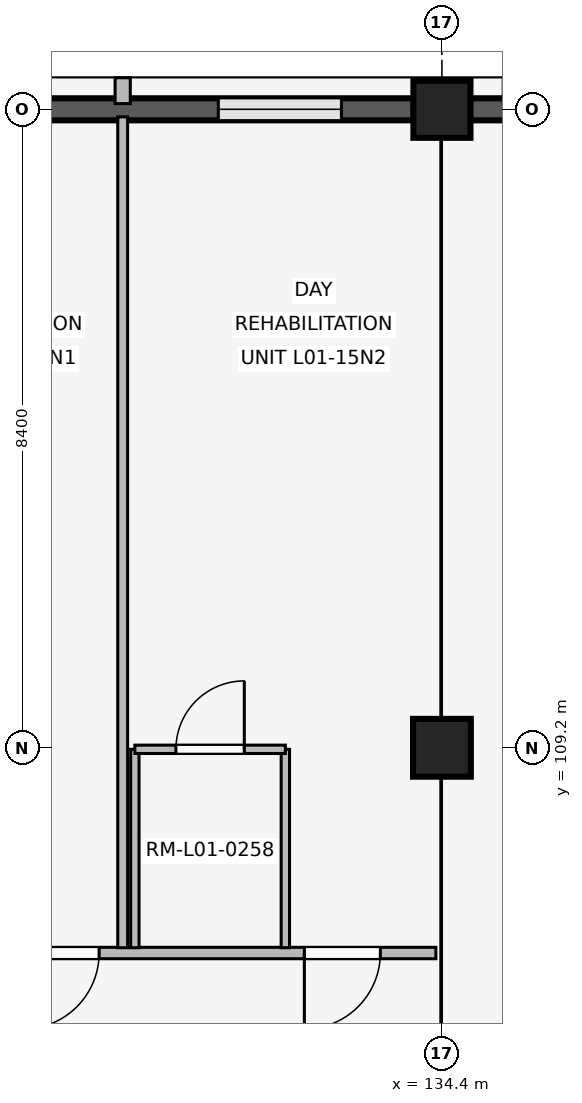
"""IFC4 building model, lengths in metres.
Left out: names, types, materials, properties, quantities, classifications, styles, units other than length and angle.
Written with IfcOpenShell. Run it as: python <this file> out.ifc"""

import sys

from ifc_helpers import new_model, si_unit, direction, frame, frame_2d, origin, origin_2d, place, context, subcontext, project, spatial, rectangle, extrude, element, fill, save


model = new_model("IFC4")
c1 = context("Model", 3, precision=1e-05, world=origin(), true_north=direction((0.0, 1.0)))
c2 = subcontext(c1, "Body", "Model", "MODEL_VIEW")
j1 = project(units=[si_unit("LENGTHUNIT", "METRE"), si_unit("PLANEANGLEUNIT", "RADIAN")], contexts=[c1])
p1 = place(None, origin())
s1 = spatial("IfcSite", under=j1, at=p1, CompositionType="ELEMENT")
p2 = place(p1, origin())
s2 = spatial("IfcBuilding", under=s1, at=p2, CompositionType="ELEMENT")
p3 = place(p2, frame((0.0, 0.0, 4.8)))
s3 = spatial("IfcBuildingStorey", under=s2, at=p3, CompositionType="ELEMENT", Elevation=4.8)
p4 = place(p3, frame((134.4, 109.2, 0.0), z_axis=(0.0, 0.0, 1.0), x_axis=(1.0, 0.0, 0.0)))
e1 = element("IfcColumn", 1, at=p4, inside=s3, PredefinedType="COLUMN", context=c2, shape_type="SweptSolid", body=[
    extrude(rectangle(XDim=0.76, YDim=0.76, at=origin_2d()), origin(), (0.0, 0.0, 1.0), 3.3),
])
p5 = place(p3, frame((134.4, 117.6, 0.0), z_axis=(0.0, 0.0, 1.0), x_axis=(1.0, 0.0, 0.0)))
e2 = element("IfcColumn", 2, at=p5, inside=s3, PredefinedType="COLUMN", context=c2, shape_type="SweptSolid", body=[
    extrude(rectangle(XDim=0.75, YDim=0.75, at=origin_2d()), origin(), (0.0, 0.0, 1.0), 3.3),
])
p6 = place(p3, frame((126.37, 117.6, 0.0), z_axis=(0.0, 0.0, 1.0), x_axis=(1.0, 0.0, 0.0)))
e3 = element("IfcWall", 3, at=p6, inside=s3, PredefinedType="SOLIDWALL", context=c2, shape_type="SweptSolid", body=[
    extrude(rectangle(XDim=7.66, YDim=0.29, at=frame_2d((3.83, 0.0))), origin(), (0.0, 0.0, 1.0), 2.42),
])
p7 = place(p6, frame((0.952, 0.0, 0.85)))
e4 = element("IfcOpeningElement", 4, at=p7, cuts=e3, PredefinedType="OPENING", context=c2, shape_type="SweptSolid", body=[
    extrude(rectangle(XDim=1.62, YDim=0.95, at=frame_2d((0.81, 0.475))), frame((0.0, 0.155, 0.0), z_axis=(0.0, -1.0, 0.0), x_axis=(1.0, 0.0, 0.0)), (0.0, 0.0, 1.0), 0.31),
])
p8 = place(p6, frame((5.088, 0.0, 0.85)))
e5 = element("IfcOpeningElement", 5, at=p8, cuts=e3, PredefinedType="OPENING", context=c2, shape_type="SweptSolid", body=[
    extrude(rectangle(XDim=1.62, YDim=0.95, at=frame_2d((0.81, 0.475))), frame((0.0, 0.155, 0.0), z_axis=(0.0, -1.0, 0.0), x_axis=(1.0, 0.0, 0.0)), (0.0, 0.0, 1.0), 0.31),
])
p9 = place(p3, frame((130.2, 117.675, 0.0), z_axis=(0.0, 0.0, 1.0), x_axis=(0.0, 1.0, 0.0)))
e6 = element("IfcWall", 6, at=p9, inside=s3, PredefinedType="ELEMENTEDWALL", context=c2, shape_type="SweptSolid", body=[
    extrude(rectangle(XDim=0.34, YDim=0.2, at=frame_2d((0.17, 0.0))), origin(), (0.0, 0.0, 1.0), 2.4),
])
p10 = place(p3, frame((134.77, 117.6, 0.0), z_axis=(0.0, 0.0, 1.0), x_axis=(1.0, 0.0, 0.0)))
e7 = element("IfcWall", 7, at=p10, inside=s3, PredefinedType="SOLIDWALL", context=c2, shape_type="SweptSolid", body=[
    extrude(rectangle(XDim=7.66, YDim=0.29, at=frame_2d((3.83, 0.0))), origin(), (0.0, 0.0, 1.0), 2.42),
])
p11 = place(p10, frame((1.112, 0.0, 1.05)))
e8 = element("IfcOpeningElement", 8, at=p11, cuts=e7, PredefinedType="OPENING", context=c2, shape_type="SweptSolid", body=[
    extrude(rectangle(XDim=1.3, YDim=0.75, at=frame_2d((0.65, 0.375))), frame((0.0, 0.155, 0.0), z_axis=(0.0, -1.0, 0.0), x_axis=(1.0, 0.0, 0.0)), (0.0, 0.0, 1.0), 0.31),
])
p12 = place(p10, frame((5.248, 0.0, 1.05)))
e9 = element("IfcOpeningElement", 9, at=p12, cuts=e7, PredefinedType="OPENING", context=c2, shape_type="SweptSolid", body=[
    extrude(rectangle(XDim=1.3, YDim=0.75, at=frame_2d((0.65, 0.375))), frame((0.0, 0.155, 0.0), z_axis=(0.0, -1.0, 0.0), x_axis=(1.0, 0.0, 0.0)), (0.0, 0.0, 1.0), 0.31),
])
p13 = place(p3, frame((134.32, 106.5, 0.0), z_axis=(0.0, 0.0, 1.0), x_axis=(-1.0, 0.0, 0.0)))
e10 = element("IfcWall", 10, at=p13, inside=s3, PredefinedType="PARTITIONING", context=c2, shape_type="SweptSolid", body=[
    extrude(rectangle(XDim=8.24, YDim=0.15, at=frame_2d((4.12, 0.0))), origin(), (0.0, 0.0, 1.0), 2.4),
])
p14 = place(p13, frame((0.73, 0.0, 0.0)))
e11 = element("IfcOpeningElement", 11, at=p14, cuts=e10, PredefinedType="OPENING", context=c2, shape_type="SweptSolid", body=[
    extrude(rectangle(XDim=1.0, YDim=2.15, at=frame_2d((0.5, 1.075))), frame((0.0, 0.085, 0.0), z_axis=(0.0, -1.0, 0.0), x_axis=(1.0, 0.0, 0.0)), (0.0, 0.0, 1.0), 0.17),
])
p15 = place(p13, frame((4.43, 0.0, 0.0)))
e12 = element("IfcOpeningElement", 12, at=p15, cuts=e10, PredefinedType="OPENING", context=c2, shape_type="SweptSolid", body=[
    extrude(rectangle(XDim=1.0, YDim=2.15, at=frame_2d((0.5, 1.075))), frame((0.0, 0.085, 0.0), z_axis=(0.0, -1.0, 0.0), x_axis=(1.0, 0.0, 0.0)), (0.0, 0.0, 1.0), 0.17),
])
p16 = place(p3, frame((130.2, 106.57, 0.0), z_axis=(0.0, 0.0, 1.0), x_axis=(0.0, 1.0, 0.0)))
e13 = element("IfcWall", 13, at=p16, inside=s3, PredefinedType="PARTITIONING", context=c2, shape_type="SweptSolid", body=[
    extrude(rectangle(XDim=10.93, YDim=0.13, at=frame_2d((5.465, 0.0))), origin(), (0.0, 0.0, 1.0), 2.4),
])
for number, where, z_axis, x_axis in (
    (14, (130.36, 106.57, 0.0), (0.0, 0.0, 1.0), (0.0, 1.0, 0.0)),
    (15, (132.34, 106.57, 0.0), (0.0, 0.0, 1.0), (0.0, 1.0, 0.0)),
):
    element("IfcWall", number, at=place(p3, frame(where, z_axis=z_axis, x_axis=x_axis)), inside=s3, PredefinedType="PARTITIONING", context=c2, shape_type="SweptSolid", body=[
        extrude(rectangle(XDim=2.61, YDim=0.11, at=frame_2d((1.305, 0.0))), origin(), (0.0, 0.0, 1.0), 2.4),
    ])
p17 = place(p3, frame((130.36, 109.18, 0.0), z_axis=(0.0, 0.0, 1.0), x_axis=(1.0, 0.0, 0.0)))
e16 = element("IfcWall", 16, at=p17, inside=s3, PredefinedType="PARTITIONING", context=c2, shape_type="SweptSolid", body=[
    extrude(rectangle(XDim=1.98, YDim=0.11, at=frame_2d((0.99, 0.0))), origin(), (0.0, 0.0, 1.0), 2.4),
])
p18 = place(p17, frame((0.54, 0.0, 0.0)))
e17 = element("IfcOpeningElement", 17, at=p18, cuts=e16, PredefinedType="OPENING", context=c2, shape_type="SweptSolid", body=[
    extrude(rectangle(XDim=0.9, YDim=2.1, at=frame_2d((0.45, 1.05))), frame((0.0, 0.065, 0.0), z_axis=(0.0, -1.0, 0.0), x_axis=(1.0, 0.0, 0.0)), (0.0, 0.0, 1.0), 0.13),
])
p19 = place(p8, origin())
e18 = element("IfcWindow", 18, at=p19, inside=s3, PartitioningType="SINGLE_PANEL", PredefinedType="WINDOW", context=c2, shape_type="SweptSolid", body=[
    extrude(rectangle(XDim=1.62, YDim=0.95, at=frame_2d((0.81, 0.475))), frame((0.0, 0.03, 0.0), z_axis=(0.0, -1.0, 0.0), x_axis=(1.0, 0.0, 0.0)), (0.0, 0.0, 1.0), 0.06),
])
fill(e5, e18)
p20 = place(p14, origin())
e19 = element("IfcDoor", 19, at=p20, inside=s3, OperationType="SINGLE_SWING_RIGHT", PredefinedType="DOOR", context=c2, shape_type="SweptSolid", body=[
    extrude(rectangle(XDim=1.0, YDim=2.15, at=frame_2d((0.5, 1.075))), frame((0.0, 0.025, 0.0), z_axis=(0.0, -1.0, 0.0), x_axis=(1.0, 0.0, 0.0)), (0.0, 0.0, 1.0), 0.05),
])
fill(e11, e19)
p21 = place(p15, origin())
e20 = element("IfcDoor", 20, at=p21, inside=s3, OperationType="SINGLE_SWING_RIGHT", PredefinedType="DOOR", context=c2, shape_type="SweptSolid", body=[
    extrude(rectangle(XDim=1.0, YDim=2.15, at=frame_2d((0.5, 1.075))), frame((0.0, 0.025, 0.0), z_axis=(0.0, -1.0, 0.0), x_axis=(1.0, 0.0, 0.0)), (0.0, 0.0, 1.0), 0.05),
])
fill(e12, e20)
p22 = place(p18, origin())
e21 = element("IfcDoor", 21, at=p22, inside=s3, OperationType="SINGLE_SWING_RIGHT", PredefinedType="DOOR", context=c2, shape_type="SweptSolid", body=[
    extrude(rectangle(XDim=0.9, YDim=2.1, at=frame_2d((0.45, 1.05))), frame((0.0, 0.025, 0.0), z_axis=(0.0, -1.0, 0.0), x_axis=(1.0, 0.0, 0.0)), (0.0, 0.0, 1.0), 0.05),
])
fill(e17, e21)
save(model, sys.argv[1])
